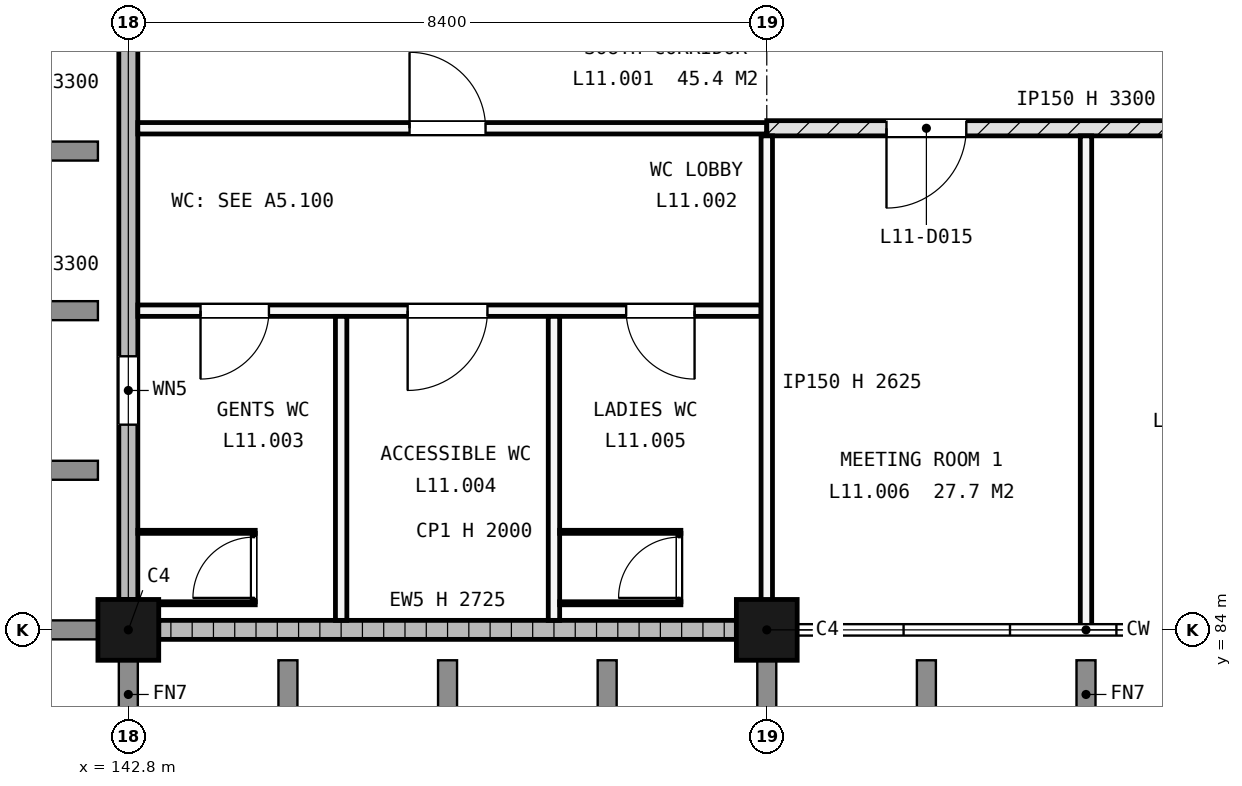
"""IFC4 building model, lengths in metres.
Left out: names, types, materials, properties, quantities, classifications, styles, units other than length and angle.
Written with IfcOpenShell. Run it as: python <this file> out.ifc"""

import sys

from ifc_helpers import new_model, si_unit, direction, frame, frame_2d, origin, origin_2d, place, context, subcontext, project, spatial, rectangle, extrude, element, fill, save


model = new_model("IFC4")
c1 = context("Model", 3, precision=1e-05, world=origin(), true_north=direction((0.0, 1.0)))
c2 = subcontext(c1, "Body", "Model", "MODEL_VIEW")
j1 = project(units=[si_unit("LENGTHUNIT", "METRE"), si_unit("PLANEANGLEUNIT", "RADIAN")], contexts=[c1])
p1 = place(None, origin())
s1 = spatial("IfcSite", under=j1, at=p1, CompositionType="ELEMENT")
p2 = place(p1, origin())
s2 = spatial("IfcBuilding", under=s1, at=p2, CompositionType="ELEMENT")
p3 = place(p2, frame((0.0, 0.0, 43.2)))
s3 = spatial("IfcBuildingStorey", under=s2, at=p3, CompositionType="ELEMENT", Elevation=43.2)
for number, where, z_axis, x_axis in (
    (1, (142.8, 84.0, -0.225), (0.0, 0.0, 1.0), (1.0, 0.0, 0.0)),
    (2, (151.2, 84.0, -0.225), (0.0, 0.0, 1.0), (1.0, 0.0, 0.0)),
):
    element("IfcColumn", number, at=place(p3, frame(where, z_axis=z_axis, x_axis=x_axis)), inside=s3, PredefinedType="COLUMN", context=c2, shape_type="SweptSolid", body=[
        extrude(rectangle(XDim=0.8, YDim=0.8, at=origin_2d()), origin(), (0.0, 0.0, 1.0), 3.6),
    ])
p4 = place(p3, frame((143.2, 84.0, 0.0), z_axis=(0.0, 0.0, 1.0), x_axis=(1.0, 0.0, 0.0)))
e3 = element("IfcWall", 3, at=p4, inside=s3, PredefinedType="STANDARD", context=c2, shape_type="SweptSolid", body=[
    extrude(rectangle(XDim=7.6, YDim=0.25, at=frame_2d((3.8, 0.0))), origin(), (0.0, 0.0, 1.0), 2.725),
])
p5 = place(p3, frame((142.8, 84.4, 0.0), z_axis=(0.0, 0.0, 1.0), x_axis=(0.0, 1.0, 0.0)))
e4 = element("IfcWall", 4, at=p5, inside=s3, PredefinedType="STANDARD", context=c2, shape_type="SweptSolid", body=[
    extrude(rectangle(XDim=7.8, YDim=0.25, at=frame_2d((3.9, 0.0))), origin(), (0.0, 0.0, 1.0), 3.3),
])
p6 = place(p5, frame((2.3, 0.0, 2.1)))
e5 = element("IfcOpeningElement", 5, at=p6, cuts=e4, PredefinedType="OPENING", context=c2, shape_type="SweptSolid", body=[
    extrude(rectangle(XDim=0.9, YDim=0.6, at=frame_2d((0.45, 0.3))), frame((0.0, 0.135, 0.0), z_axis=(0.0, -1.0, 0.0), x_axis=(1.0, 0.0, 0.0)), (0.0, 0.0, 1.0), 0.27),
])
p7 = place(p3, frame((142.925, 88.2, 0.0), z_axis=(0.0, 0.0, 1.0), x_axis=(1.0, 0.0, 0.0)))
e6 = element("IfcWall", 6, at=p7, inside=s3, PredefinedType="PARTITIONING", context=c2, shape_type="SweptSolid", body=[
    extrude(rectangle(XDim=8.2, YDim=0.15, at=frame_2d((4.1, 0.0))), origin(), (0.0, 0.0, 1.0), 3.3),
])
p8 = place(p7, frame((0.825, 0.0, 0.0)))
e7 = element("IfcOpeningElement", 7, at=p8, cuts=e6, PredefinedType="OPENING", context=c2, shape_type="SweptSolid", body=[
    extrude(rectangle(XDim=0.9, YDim=2.1, at=frame_2d((0.45, 1.05))), frame((0.0, 0.085, 0.0), z_axis=(0.0, -1.0, 0.0), x_axis=(1.0, 0.0, 0.0)), (0.0, 0.0, 1.0), 0.17),
])
p9 = place(p7, frame((3.55, 0.0, 0.0)))
e8 = element("IfcOpeningElement", 8, at=p9, cuts=e6, PredefinedType="OPENING", context=c2, shape_type="SweptSolid", body=[
    extrude(rectangle(XDim=1.05, YDim=2.25, at=frame_2d((0.525, 1.125))), frame((0.0, 0.085, 0.0), z_axis=(0.0, -1.0, 0.0), x_axis=(1.0, 0.0, 0.0)), (0.0, 0.0, 1.0), 0.17),
])
p10 = place(p7, frame((6.425, 0.0, 0.0)))
e9 = element("IfcOpeningElement", 9, at=p10, cuts=e6, PredefinedType="OPENING", context=c2, shape_type="SweptSolid", body=[
    extrude(rectangle(XDim=0.9, YDim=2.1, at=frame_2d((0.45, 1.05))), frame((0.0, 0.085, 0.0), z_axis=(0.0, -1.0, 0.0), x_axis=(1.0, 0.0, 0.0)), (0.0, 0.0, 1.0), 0.17),
])
p11 = place(p3, frame((142.925, 90.6, 0.0), z_axis=(0.0, 0.0, 1.0), x_axis=(1.0, 0.0, 0.0)))
e10 = element("IfcWall", 10, at=p11, inside=s3, PredefinedType="PARTITIONING", context=c2, shape_type="SweptSolid", body=[
    extrude(rectangle(XDim=8.275, YDim=0.15, at=frame_2d((4.137, 0.0))), origin(), (0.0, 0.0, 1.0), 3.3),
])
p12 = place(p11, frame((3.575, 0.0, 0.0)))
e11 = element("IfcOpeningElement", 11, at=p12, cuts=e10, PredefinedType="OPENING", context=c2, shape_type="SweptSolid", body=[
    extrude(rectangle(XDim=1.0, YDim=2.1, at=frame_2d((0.5, 1.05))), frame((0.0, 0.085, 0.0), z_axis=(0.0, -1.0, 0.0), x_axis=(1.0, 0.0, 0.0)), (0.0, 0.0, 1.0), 0.17),
])
p13 = place(p3, frame((151.2, 90.6, 0.0), z_axis=(0.0, 0.0, 1.0), x_axis=(1.0, 0.0, 0.0)))
e12 = element("IfcWall", 12, at=p13, inside=s3, PredefinedType="SOLIDWALL", context=c2, shape_type="SweptSolid", body=[
    extrude(rectangle(XDim=16.8, YDim=0.2, at=frame_2d((8.4, 0.0))), origin(), (0.0, 0.0, 1.0), 3.3),
])
p14 = place(p13, frame((1.575, 0.0, 0.0)))
e13 = element("IfcOpeningElement", 13, at=p14, cuts=e12, PredefinedType="OPENING", context=c2, shape_type="SweptSolid", body=[
    extrude(rectangle(XDim=1.05, YDim=2.1, at=frame_2d((0.525, 1.05))), frame((0.0, 0.11, 0.0), z_axis=(0.0, -1.0, 0.0), x_axis=(1.0, 0.0, 0.0)), (0.0, 0.0, 1.0), 0.22),
])
p15 = place(p13, frame((5.775, 0.0, 0.0)))
e14 = element("IfcOpeningElement", 14, at=p15, cuts=e12, PredefinedType="OPENING", context=c2, shape_type="SweptSolid", body=[
    extrude(rectangle(XDim=1.05, YDim=2.1, at=frame_2d((0.525, 1.05))), frame((0.0, 0.11, 0.0), z_axis=(0.0, -1.0, 0.0), x_axis=(1.0, 0.0, 0.0)), (0.0, 0.0, 1.0), 0.22),
])
p16 = place(p13, frame((12.05, 0.0, 0.0)))
e15 = element("IfcOpeningElement", 15, at=p16, cuts=e12, PredefinedType="OPENING", context=c2, shape_type="SweptSolid", body=[
    extrude(rectangle(XDim=1.1, YDim=2.25, at=frame_2d((0.55, 1.125))), frame((0.0, 0.11, 0.0), z_axis=(0.0, -1.0, 0.0), x_axis=(1.0, 0.0, 0.0)), (0.0, 0.0, 1.0), 0.22),
])
for number, where, z_axis, x_axis in (
    (16, (145.6, 84.125, 0.0), (0.0, 0.0, 1.0), (0.0, 1.0, 0.0)),
    (17, (148.4, 84.125, 0.0), (0.0, 0.0, 1.0), (0.0, 1.0, 0.0)),
):
    element("IfcWall", number, at=place(p3, frame(where, z_axis=z_axis, x_axis=x_axis)), inside=s3, PredefinedType="PARTITIONING", context=c2, shape_type="SweptSolid", body=[
        extrude(rectangle(XDim=4.0, YDim=0.15, at=frame_2d((2.0, 0.0))), origin(), (0.0, 0.0, 1.0), 3.3),
    ])
p17 = place(p3, frame((151.2, 84.0, 0.0), z_axis=(0.0, 0.0, 1.0), x_axis=(0.0, 1.0, 0.0)))
e18 = element("IfcWall", 18, at=p17, inside=s3, PredefinedType="PARTITIONING", context=c2, shape_type="SweptSolid", body=[
    extrude(rectangle(XDim=6.5, YDim=0.15, at=frame_2d((3.25, 0.0))), origin(), (0.0, 0.0, 1.0), 2.625),
])
p18 = place(p3, frame((155.4, 84.0, 0.0), z_axis=(0.0, 0.0, 1.0), x_axis=(0.0, 1.0, 0.0)))
e19 = element("IfcWall", 19, at=p18, inside=s3, PredefinedType="PARTITIONING", context=c2, shape_type="SweptSolid", body=[
    extrude(rectangle(XDim=6.5, YDim=0.15, at=frame_2d((3.25, 0.0))), origin(), (0.0, 0.0, 1.0), 3.3),
])
p19 = place(p3, frame((142.93, 84.35, 0.0), z_axis=(0.0, 0.0, 1.0), x_axis=(1.0, 0.0, 0.0)))
e20 = element("IfcWall", 20, at=p19, inside=s3, PredefinedType="PARTITIONING", context=c2, shape_type="SweptSolid", body=[
    extrude(rectangle(XDim=1.54, YDim=0.04, at=frame_2d((0.77, 0.0))), origin(), (0.0, 0.0, 1.0), 2.0),
])
p20 = place(p3, frame((142.925, 85.29, 0.0), z_axis=(0.0, 0.0, 1.0), x_axis=(1.0, 0.0, 0.0)))
e21 = element("IfcWall", 21, at=p20, inside=s3, PredefinedType="PARTITIONING", context=c2, shape_type="SweptSolid", body=[
    extrude(rectangle(XDim=1.545, YDim=0.04, at=frame_2d((0.772, 0.0))), origin(), (0.0, 0.0, 1.0), 2.0),
])
p21 = place(p3, frame((144.45, 84.37, 0.0), z_axis=(0.0, 0.0, 1.0), x_axis=(0.0, 1.0, 0.0)))
e22 = element("IfcWall", 22, at=p21, inside=s3, PredefinedType="PARTITIONING", context=c2, shape_type="SweptSolid", body=[
    extrude(rectangle(XDim=0.9, YDim=0.04, at=frame_2d((0.45, 0.0))), origin(), (0.0, 0.0, 1.0), 2.0),
])
p22 = place(p21, frame((0.05, 0.0, 0.0)))
e23 = element("IfcOpeningElement", 23, at=p22, cuts=e22, PredefinedType="OPENING", context=c2, shape_type="SweptSolid", body=[
    extrude(rectangle(XDim=0.8, YDim=2.0, at=frame_2d((0.4, 1.0))), frame((0.0, 0.03, 0.0), z_axis=(0.0, -1.0, 0.0), x_axis=(1.0, 0.0, 0.0)), (0.0, 0.0, 1.0), 0.06),
])
for number, where, z_axis, x_axis in (
    (24, (148.475, 84.35, 0.0), (0.0, 0.0, 1.0), (1.0, 0.0, 0.0)),
    (25, (148.475, 85.29, 0.0), (0.0, 0.0, 1.0), (1.0, 0.0, 0.0)),
):
    element("IfcWall", number, at=place(p3, frame(where, z_axis=z_axis, x_axis=x_axis)), inside=s3, PredefinedType="PARTITIONING", context=c2, shape_type="SweptSolid", body=[
        extrude(rectangle(XDim=1.595, YDim=0.04, at=frame_2d((0.797, 0.0))), origin(), (0.0, 0.0, 1.0), 2.0),
    ])
p23 = place(p3, frame((150.05, 84.37, 0.0), z_axis=(0.0, 0.0, 1.0), x_axis=(0.0, 1.0, 0.0)))
e26 = element("IfcWall", 26, at=p23, inside=s3, PredefinedType="PARTITIONING", context=c2, shape_type="SweptSolid", body=[
    extrude(rectangle(XDim=0.9, YDim=0.04, at=frame_2d((0.45, 0.0))), origin(), (0.0, 0.0, 1.0), 2.0),
])
p24 = place(p23, frame((0.05, 0.0, 0.0)))
e27 = element("IfcOpeningElement", 27, at=p24, cuts=e26, PredefinedType="OPENING", context=c2, shape_type="SweptSolid", body=[
    extrude(rectangle(XDim=0.8, YDim=2.0, at=frame_2d((0.4, 1.0))), frame((0.0, 0.03, 0.0), z_axis=(0.0, -1.0, 0.0), x_axis=(1.0, 0.0, 0.0)), (0.0, 0.0, 1.0), 0.06),
])
p25 = place(p6, origin())
e28 = element("IfcWindow", 28, at=p25, inside=s3, PartitioningType="SINGLE_PANEL", PredefinedType="WINDOW", context=c2, shape_type="SweptSolid", body=[
    extrude(rectangle(XDim=0.9, YDim=0.6, at=frame_2d((0.45, 0.3))), frame((0.0, 0.03, 0.0), z_axis=(0.0, -1.0, 0.0), x_axis=(1.0, 0.0, 0.0)), (0.0, 0.0, 1.0), 0.06),
])
fill(e5, e28)
p26 = place(p8, origin())
e29 = element("IfcDoor", 29, at=p26, inside=s3, OperationType="SINGLE_SWING_LEFT", PredefinedType="DOOR", context=c2, shape_type="SweptSolid", body=[
    extrude(rectangle(XDim=0.9, YDim=2.1, at=frame_2d((0.45, 1.05))), frame((0.0, 0.025, 0.0), z_axis=(0.0, -1.0, 0.0), x_axis=(1.0, 0.0, 0.0)), (0.0, 0.0, 1.0), 0.05),
])
fill(e7, e29)
p27 = place(p9, origin())
e30 = element("IfcDoor", 30, at=p27, inside=s3, OperationType="SINGLE_SWING_LEFT", PredefinedType="DOOR", context=c2, shape_type="SweptSolid", body=[
    extrude(rectangle(XDim=1.05, YDim=2.25, at=frame_2d((0.525, 1.125))), frame((0.0, 0.025, 0.0), z_axis=(0.0, -1.0, 0.0), x_axis=(1.0, 0.0, 0.0)), (0.0, 0.0, 1.0), 0.05),
])
fill(e8, e30)
p28 = place(p10, origin())
e31 = element("IfcDoor", 31, at=p28, inside=s3, OperationType="SINGLE_SWING_RIGHT", PredefinedType="DOOR", context=c2, shape_type="SweptSolid", body=[
    extrude(rectangle(XDim=0.9, YDim=2.1, at=frame_2d((0.45, 1.05))), frame((0.0, 0.025, 0.0), z_axis=(0.0, -1.0, 0.0), x_axis=(1.0, 0.0, 0.0)), (0.0, 0.0, 1.0), 0.05),
])
fill(e9, e31)
p29 = place(p14, origin())
e32 = element("IfcDoor", 32, at=p29, inside=s3, OperationType="SINGLE_SWING_LEFT", PredefinedType="DOOR", context=c2, shape_type="SweptSolid", body=[
    extrude(rectangle(XDim=1.05, YDim=2.1, at=frame_2d((0.525, 1.05))), frame((0.0, 0.025, 0.0), z_axis=(0.0, -1.0, 0.0), x_axis=(1.0, 0.0, 0.0)), (0.0, 0.0, 1.0), 0.05),
])
fill(e13, e32)
p30 = place(p12, origin())
e33 = element("IfcDoor", 33, at=p30, inside=s3, OperationType="SINGLE_SWING_RIGHT", PredefinedType="DOOR", context=c2, shape_type="SweptSolid", body=[
    extrude(rectangle(XDim=1.0, YDim=2.1, at=frame_2d((0.5, 1.05))), frame((0.0, 0.025, 0.0), z_axis=(0.0, -1.0, 0.0), x_axis=(1.0, 0.0, 0.0)), (0.0, 0.0, 1.0), 0.05),
])
fill(e11, e33)
p31 = place(p22, origin())
e34 = element("IfcDoor", 34, at=p31, inside=s3, OperationType="SINGLE_SWING_LEFT", PredefinedType="DOOR", context=c2, shape_type="SweptSolid", body=[
    extrude(rectangle(XDim=0.8, YDim=2.0, at=frame_2d((0.4, 1.0))), frame((0.0, 0.02, 0.0), z_axis=(0.0, -1.0, 0.0), x_axis=(1.0, 0.0, 0.0)), (0.0, 0.0, 1.0), 0.04),
])
fill(e23, e34)
p32 = place(p24, origin())
e35 = element("IfcDoor", 35, at=p32, inside=s3, OperationType="SINGLE_SWING_LEFT", PredefinedType="DOOR", context=c2, shape_type="SweptSolid", body=[
    extrude(rectangle(XDim=0.8, YDim=2.0, at=frame_2d((0.4, 1.0))), frame((0.0, 0.02, 0.0), z_axis=(0.0, -1.0, 0.0), x_axis=(1.0, 0.0, 0.0)), (0.0, 0.0, 1.0), 0.04),
])
fill(e27, e35)
save(model, sys.argv[1])
